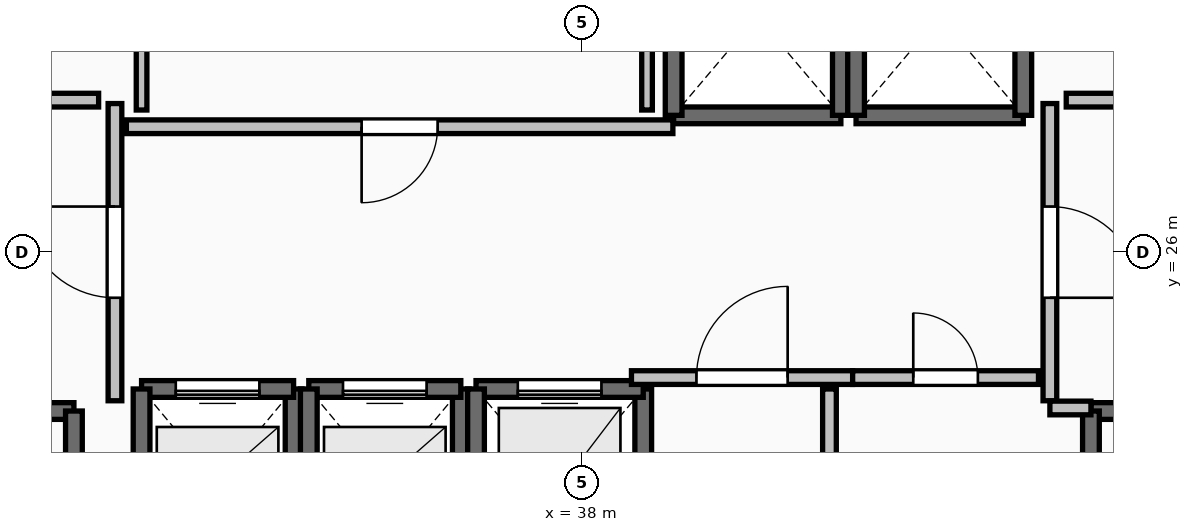
"""IFC4 building model, lengths in metres.
Left out: names, types, materials, properties, quantities, classifications, styles, units other than length and angle.
Written with IfcOpenShell. Run it as: python <this file> out.ifc"""

import sys

from ifc_helpers import new_model, si_unit, direction, frame, frame_2d, origin, place, context, subcontext, project, spatial, rectangle, extrude, element, fill, save


model = new_model("IFC4")
c1 = context("Model", 3, precision=1e-05, world=origin(), true_north=direction((0.0, 1.0)))
c2 = subcontext(c1, "Body", "Model", "MODEL_VIEW")
j1 = project(units=[si_unit("LENGTHUNIT", "METRE"), si_unit("PLANEANGLEUNIT", "RADIAN")], contexts=[c1])
p1 = place(None, origin())
s1 = spatial("IfcSite", under=j1, at=p1, CompositionType="ELEMENT")
p2 = place(p1, origin())
s2 = spatial("IfcBuilding", under=s1, at=p2, CompositionType="ELEMENT")
p3 = place(p2, frame((0.0, 0.0, 139.6)))
s3 = spatial("IfcBuildingStorey", under=s2, at=p3, CompositionType="ELEMENT", Elevation=139.6)
p4 = place(p3, frame((27.94, 23.91, 0.0), z_axis=(0.0, 0.0, 1.0), x_axis=(1.0, 0.0, 0.0)))
e1 = element("IfcWall", 1, at=p4, inside=s3, PredefinedType="SOLIDWALL", context=c2, shape_type="SweptSolid", body=[
    extrude(rectangle(XDim=3.37, YDim=0.22, at=frame_2d((1.685, 0.0))), origin(), (0.0, 0.0, 1.0), 3.24),
])
p5 = place(p4, frame((1.135, 0.0, 0.0)))
e2 = element("IfcOpeningElement", 2, at=p5, cuts=e1, PredefinedType="OPENING", context=c2, shape_type="SweptSolid", body=[
    extrude(rectangle(XDim=1.1, YDim=2.15, at=frame_2d((0.55, 1.075))), frame((0.0, 0.125, 0.0), z_axis=(0.0, -1.0, 0.0), x_axis=(1.0, 0.0, 0.0)), (0.0, 0.0, 1.0), 0.25),
])
p6 = place(p3, frame((31.31, 23.91, 0.0), z_axis=(0.0, 0.0, 1.0), x_axis=(0.0, -1.0, 0.0)))
e3 = element("IfcWall", 3, at=p6, inside=s3, PredefinedType="SOLIDWALL", context=c2, shape_type="SweptSolid", body=[
    extrude(rectangle(XDim=7.42, YDim=0.22, at=frame_2d((3.71, 0.0))), origin(), (0.0, 0.0, 1.0), 3.24),
])
p7 = place(p3, frame((44.69, 23.91, 0.0), z_axis=(0.0, 0.0, 1.0), x_axis=(1.0, 0.0, 0.0)))
e4 = element("IfcWall", 4, at=p7, inside=s3, PredefinedType="SOLIDWALL", context=c2, shape_type="SweptSolid", body=[
    extrude(rectangle(XDim=3.37, YDim=0.22, at=frame_2d((1.685, 0.0))), origin(), (0.0, 0.0, 1.0), 3.24),
])
p8 = place(p7, frame((1.135, 0.0, 0.0)))
e5 = element("IfcOpeningElement", 5, at=p8, cuts=e4, PredefinedType="OPENING", context=c2, shape_type="SweptSolid", body=[
    extrude(rectangle(XDim=1.1, YDim=2.15, at=frame_2d((0.55, 1.075))), frame((0.0, 0.125, 0.0), z_axis=(0.0, -1.0, 0.0), x_axis=(1.0, 0.0, 0.0)), (0.0, 0.0, 1.0), 0.25),
])
p9 = place(p3, frame((44.69, 16.49, 0.0), z_axis=(0.0, 0.0, 1.0), x_axis=(0.0, 1.0, 0.0)))
e6 = element("IfcWall", 6, at=p9, inside=s3, PredefinedType="SOLIDWALL", context=c2, shape_type="SweptSolid", body=[
    extrude(rectangle(XDim=7.42, YDim=0.22, at=frame_2d((3.71, 0.0))), origin(), (0.0, 0.0, 1.0), 3.24),
])
p10 = place(p3, frame((34.2, 21.8, 0.0), z_axis=(0.0, 0.0, 1.0), x_axis=(0.0, 1.0, 0.0)))
e7 = element("IfcWall", 7, at=p10, inside=s3, PredefinedType="SOLIDWALL", context=c2, shape_type="SweptSolid", body=[
    extrude(rectangle(XDim=2.4, YDim=0.22, at=frame_2d((1.2, 0.0))), origin(), (0.0, 0.0, 1.0), 3.24),
])
p11 = place(p3, frame((34.2, 24.2, 0.0), z_axis=(0.0, 0.0, 1.0), x_axis=(-1.0, 0.0, 0.0)))
e8 = element("IfcWall", 8, at=p11, inside=s3, PredefinedType="SOLIDWALL", context=c2, shape_type="SweptSolid", body=[
    extrude(rectangle(XDim=2.0, YDim=0.22, at=frame_2d((1.0, 0.0))), origin(), (0.0, 0.0, 1.0), 3.24),
])
p12 = place(p11, frame((0.45, 0.0, 0.0)))
e9 = element("IfcOpeningElement", 9, at=p12, cuts=e8, PredefinedType="OPENING", context=c2, shape_type="SweptSolid", body=[
    extrude(rectangle(XDim=1.1, YDim=2.2, at=frame_2d((0.55, 1.1))), frame((0.0, 0.125, 0.0), z_axis=(0.0, -1.0, 0.0), x_axis=(1.0, 0.0, 0.0)), (0.0, 0.0, 1.0), 0.25),
])
for number, where, z_axis, x_axis in (
    (10, (32.2, 24.2, 0.0), (0.0, 0.0, 1.0), (0.0, -1.0, 0.0)),
    (11, (36.4, 21.8, 0.0), (0.0, 0.0, 1.0), (0.0, 1.0, 0.0)),
):
    element("IfcWall", number, at=place(p3, frame(where, z_axis=z_axis, x_axis=x_axis)), inside=s3, PredefinedType="SOLIDWALL", context=c2, shape_type="SweptSolid", body=[
        extrude(rectangle(XDim=2.4, YDim=0.22, at=frame_2d((1.2, 0.0))), origin(), (0.0, 0.0, 1.0), 3.24),
    ])
p13 = place(p3, frame((36.4, 24.2, 0.0), z_axis=(0.0, 0.0, 1.0), x_axis=(-1.0, 0.0, 0.0)))
e12 = element("IfcWall", 12, at=p13, inside=s3, PredefinedType="SOLIDWALL", context=c2, shape_type="SweptSolid", body=[
    extrude(rectangle(XDim=2.0, YDim=0.22, at=frame_2d((1.0, 0.0))), origin(), (0.0, 0.0, 1.0), 3.24),
])
p14 = place(p13, frame((0.45, 0.0, 0.0)))
e13 = element("IfcOpeningElement", 13, at=p14, cuts=e12, PredefinedType="OPENING", context=c2, shape_type="SweptSolid", body=[
    extrude(rectangle(XDim=1.1, YDim=2.2, at=frame_2d((0.55, 1.1))), frame((0.0, 0.125, 0.0), z_axis=(0.0, -1.0, 0.0), x_axis=(1.0, 0.0, 0.0)), (0.0, 0.0, 1.0), 0.25),
])
p15 = place(p3, frame((34.4, 24.2, 0.0), z_axis=(0.0, 0.0, 1.0), x_axis=(0.0, -1.0, 0.0)))
e14 = element("IfcWall", 14, at=p15, inside=s3, PredefinedType="SOLIDWALL", context=c2, shape_type="SweptSolid", body=[
    extrude(rectangle(XDim=2.4, YDim=0.22, at=frame_2d((1.2, 0.0))), origin(), (0.0, 0.0, 1.0), 3.24),
])
p16 = place(p3, frame((38.8, 21.6, 0.0), z_axis=(0.0, 0.0, 1.0), x_axis=(0.0, 1.0, 0.0)))
e15 = element("IfcWall", 15, at=p16, inside=s3, PredefinedType="SOLIDWALL", context=c2, shape_type="SweptSolid", body=[
    extrude(rectangle(XDim=2.6, YDim=0.22, at=frame_2d((1.3, 0.0))), origin(), (0.0, 0.0, 1.0), 3.24),
])
p17 = place(p3, frame((38.8, 24.2, 0.0), z_axis=(0.0, 0.0, 1.0), x_axis=(-1.0, 0.0, 0.0)))
e16 = element("IfcWall", 16, at=p17, inside=s3, PredefinedType="SOLIDWALL", context=c2, shape_type="SweptSolid", body=[
    extrude(rectangle(XDim=2.2, YDim=0.22, at=frame_2d((1.1, 0.0))), origin(), (0.0, 0.0, 1.0), 3.24),
])
p18 = place(p17, frame((0.55, 0.0, 0.0)))
e17 = element("IfcOpeningElement", 17, at=p18, cuts=e16, PredefinedType="OPENING", context=c2, shape_type="SweptSolid", body=[
    extrude(rectangle(XDim=1.1, YDim=2.2, at=frame_2d((0.55, 1.1))), frame((0.0, 0.125, 0.0), z_axis=(0.0, -1.0, 0.0), x_axis=(1.0, 0.0, 0.0)), (0.0, 0.0, 1.0), 0.25),
])
p19 = place(p3, frame((36.6, 24.2, 0.0), z_axis=(0.0, 0.0, 1.0), x_axis=(0.0, -1.0, 0.0)))
e18 = element("IfcWall", 18, at=p19, inside=s3, PredefinedType="SOLIDWALL", context=c2, shape_type="SweptSolid", body=[
    extrude(rectangle(XDim=2.6, YDim=0.22, at=frame_2d((1.3, 0.0))), origin(), (0.0, 0.0, 1.0), 3.24),
])
p20 = place(p3, frame((39.2, 27.8, 0.0), z_axis=(0.0, 0.0, 1.0), x_axis=(1.0, 0.0, 0.0)))
e19 = element("IfcWall", 19, at=p20, inside=s3, PredefinedType="SOLIDWALL", context=c2, shape_type="SweptSolid", body=[
    extrude(rectangle(XDim=2.2, YDim=0.22, at=frame_2d((1.1, 0.0))), origin(), (0.0, 0.0, 1.0), 3.24),
])
for number, where, z_axis, x_axis in (
    (20, (41.4, 27.8, 0.0), (0.0, 0.0, 1.0), (0.0, 1.0, 0.0)),
    (21, (39.2, 30.4, 0.0), (0.0, 0.0, 1.0), (0.0, -1.0, 0.0)),
):
    element("IfcWall", number, at=place(p3, frame(where, z_axis=z_axis, x_axis=x_axis)), inside=s3, PredefinedType="SOLIDWALL", context=c2, shape_type="SweptSolid", body=[
        extrude(rectangle(XDim=2.6, YDim=0.22, at=frame_2d((1.3, 0.0))), origin(), (0.0, 0.0, 1.0), 3.24),
    ])
p21 = place(p3, frame((41.6, 27.8, 0.0), z_axis=(0.0, 0.0, 1.0), x_axis=(1.0, 0.0, 0.0)))
e22 = element("IfcWall", 22, at=p21, inside=s3, PredefinedType="SOLIDWALL", context=c2, shape_type="SweptSolid", body=[
    extrude(rectangle(XDim=2.2, YDim=0.22, at=frame_2d((1.1, 0.0))), origin(), (0.0, 0.0, 1.0), 3.24),
])
for number, where, z_axis, x_axis in (
    (23, (43.8, 27.8, 0.0), (0.0, 0.0, 1.0), (0.0, 1.0, 0.0)),
    (24, (41.6, 30.4, 0.0), (0.0, 0.0, 1.0), (0.0, -1.0, 0.0)),
):
    element("IfcWall", number, at=place(p3, frame(where, z_axis=z_axis, x_axis=x_axis)), inside=s3, PredefinedType="SOLIDWALL", context=c2, shape_type="SweptSolid", body=[
        extrude(rectangle(XDim=2.6, YDim=0.22, at=frame_2d((1.3, 0.0))), origin(), (0.0, 0.0, 1.0), 3.24),
    ])
p22 = place(p3, frame((31.85, 24.045, 0.0), z_axis=(0.0, 0.0, 1.0), x_axis=(0.0, 1.0, 0.0)))
e25 = element("IfcWall", 25, at=p22, inside=s3, PredefinedType="PARTITIONING", context=c2, shape_type="SweptSolid", body=[
    extrude(rectangle(XDim=3.91, YDim=0.18, at=frame_2d((1.955, 0.0))), origin(), (0.0, 0.0, 1.0), 3.24),
])
p23 = place(p22, frame((1.355, 0.0, 0.0)))
e26 = element("IfcOpeningElement", 26, at=p23, cuts=e25, PredefinedType="OPENING", context=c2, shape_type="SweptSolid", body=[
    extrude(rectangle(XDim=1.2, YDim=2.15, at=frame_2d((0.6, 1.075))), frame((0.0, 0.105, 0.0), z_axis=(0.0, -1.0, 0.0), x_axis=(1.0, 0.0, 0.0)), (0.0, 0.0, 1.0), 0.21),
])
p24 = place(p3, frame((44.15, 27.955, 0.0), z_axis=(0.0, 0.0, 1.0), x_axis=(0.0, -1.0, 0.0)))
e27 = element("IfcWall", 27, at=p24, inside=s3, PredefinedType="PARTITIONING", context=c2, shape_type="SweptSolid", body=[
    extrude(rectangle(XDim=3.91, YDim=0.18, at=frame_2d((1.955, 0.0))), origin(), (0.0, 0.0, 1.0), 3.24),
])
p25 = place(p24, frame((1.355, 0.0, 0.0)))
e28 = element("IfcOpeningElement", 28, at=p25, cuts=e27, PredefinedType="OPENING", context=c2, shape_type="SweptSolid", body=[
    extrude(rectangle(XDim=1.2, YDim=2.15, at=frame_2d((0.6, 1.075))), frame((0.0, 0.105, 0.0), z_axis=(0.0, -1.0, 0.0), x_axis=(1.0, 0.0, 0.0)), (0.0, 0.0, 1.0), 0.21),
])
p26 = place(p3, frame((44.15, 23.95, 0.0), z_axis=(0.0, 0.0, 1.0), x_axis=(1.0, 0.0, 0.0)))
e29 = element("IfcWall", 29, at=p26, inside=s3, PredefinedType="PARTITIONING", context=c2, shape_type="SweptSolid", body=[
    extrude(rectangle(XDim=0.54, YDim=0.18, at=frame_2d((0.27, 0.0))), origin(), (0.0, 0.0, 1.0), 3.24),
])
p27 = place(p3, frame((38.645, 24.35, 0.0), z_axis=(0.0, 0.0, 1.0), x_axis=(1.0, 0.0, 0.0)))
e30 = element("IfcWall", 30, at=p27, inside=s3, PredefinedType="PARTITIONING", context=c2, shape_type="SweptSolid", body=[
    extrude(rectangle(XDim=2.91, YDim=0.18, at=frame_2d((1.455, 0.0))), origin(), (0.0, 0.0, 1.0), 3.24),
])
p28 = place(p27, frame((0.855, 0.0, 0.0)))
e31 = element("IfcOpeningElement", 31, at=p28, cuts=e30, PredefinedType="OPENING", context=c2, shape_type="SweptSolid", body=[
    extrude(rectangle(XDim=1.2, YDim=2.15, at=frame_2d((0.6, 1.075))), frame((0.0, 0.105, 0.0), z_axis=(0.0, -1.0, 0.0), x_axis=(1.0, 0.0, 0.0)), (0.0, 0.0, 1.0), 0.21),
])
p29 = place(p3, frame((41.555, 24.35, 0.0), z_axis=(0.0, 0.0, 1.0), x_axis=(1.0, 0.0, 0.0)))
e32 = element("IfcWall", 32, at=p29, inside=s3, PredefinedType="PARTITIONING", context=c2, shape_type="SweptSolid", body=[
    extrude(rectangle(XDim=2.445, YDim=0.18, at=frame_2d((1.223, 0.0))), origin(), (0.0, 0.0, 1.0), 3.24),
])
p30 = place(p29, frame((0.798, 0.0, 0.0)))
e33 = element("IfcOpeningElement", 33, at=p30, cuts=e32, PredefinedType="OPENING", context=c2, shape_type="SweptSolid", body=[
    extrude(rectangle(XDim=0.85, YDim=2.1, at=frame_2d((0.425, 1.05))), frame((0.0, 0.105, 0.0), z_axis=(0.0, -1.0, 0.0), x_axis=(1.0, 0.0, 0.0)), (0.0, 0.0, 1.0), 0.21),
])
p31 = place(p3, frame((39.19, 27.65, 0.0), z_axis=(0.0, 0.0, 1.0), x_axis=(-1.0, 0.0, 0.0)))
e34 = element("IfcWall", 34, at=p31, inside=s3, PredefinedType="PARTITIONING", context=c2, shape_type="SweptSolid", body=[
    extrude(rectangle(XDim=7.19, YDim=0.18, at=frame_2d((3.595, 0.0))), origin(), (0.0, 0.0, 1.0), 3.24),
])
p32 = place(p31, frame((3.095, 0.0, 0.0)))
e35 = element("IfcOpeningElement", 35, at=p32, cuts=e34, PredefinedType="OPENING", context=c2, shape_type="SweptSolid", body=[
    extrude(rectangle(XDim=1.0, YDim=2.15, at=frame_2d((0.5, 1.075))), frame((0.0, 0.105, 0.0), z_axis=(0.0, -1.0, 0.0), x_axis=(1.0, 0.0, 0.0)), (0.0, 0.0, 1.0), 0.21),
])
p33 = place(p3, frame((41.25, 20.305, 0.0), z_axis=(0.0, 0.0, 1.0), x_axis=(0.0, 1.0, 0.0)))
e36 = element("IfcWall", 36, at=p33, inside=s3, PredefinedType="PARTITIONING", context=c2, shape_type="SweptSolid", body=[
    extrude(rectangle(XDim=3.895, YDim=0.18, at=frame_2d((1.948, 0.0))), origin(), (0.0, 0.0, 1.0), 3.24),
])
p34 = place(p33, frame((1.522, 0.0, 0.0)))
e37 = element("IfcOpeningElement", 37, at=p34, cuts=e36, PredefinedType="OPENING", context=c2, shape_type="SweptSolid", body=[
    extrude(rectangle(XDim=0.85, YDim=2.1, at=frame_2d((0.425, 1.05))), frame((0.0, 0.105, 0.0), z_axis=(0.0, -1.0, 0.0), x_axis=(1.0, 0.0, 0.0)), (0.0, 0.0, 1.0), 0.21),
])
for number, where, z_axis, x_axis in (
    (38, (31.635, 28.0, 0.0), (0.0, 0.0, 1.0), (-1.0, 0.0, 0.0)),
    (39, (45.28, 28.0, 0.0), (0.0, 0.0, 1.0), (-1.0, 0.0, 0.0)),
):
    element("IfcWall", number, at=place(p3, frame(where, z_axis=z_axis, x_axis=x_axis)), inside=s3, PredefinedType="PARTITIONING", context=c2, shape_type="SweptSolid", body=[
        extrude(rectangle(XDim=0.915, YDim=0.18, at=frame_2d((0.458, 0.0))), origin(), (0.0, 0.0, 1.0), 3.24),
    ])
for number, where, z_axis, x_axis in (
    (40, (32.2, 30.26, 0.0), (0.0, 0.0, 1.0), (0.0, -1.0, 0.0)),
    (41, (38.85, 27.87, 0.0), (0.0, 0.0, 1.0), (0.0, 1.0, 0.0)),
):
    element("IfcWall", number, at=place(p3, frame(where, z_axis=z_axis, x_axis=x_axis)), inside=s3, PredefinedType="PARTITIONING", context=c2, shape_type="SweptSolid", body=[
        extrude(rectangle(XDim=2.39, YDim=0.14, at=frame_2d((1.195, 0.0))), origin(), (0.0, 0.0, 1.0), 3.24),
    ])
p35 = place(p12, origin())
e42 = element("IfcDoor", 42, at=p35, inside=s3, OperationType="SLIDING_TO_LEFT", PredefinedType="DOOR", context=c2, shape_type="SweptSolid", body=[
    extrude(rectangle(XDim=1.1, YDim=2.2, at=frame_2d((0.55, 1.1))), frame((0.0, 0.025, 0.0), z_axis=(0.0, -1.0, 0.0), x_axis=(1.0, 0.0, 0.0)), (0.0, 0.0, 1.0), 0.05),
])
fill(e9, e42)
p36 = place(p14, origin())
e43 = element("IfcDoor", 43, at=p36, inside=s3, OperationType="SLIDING_TO_LEFT", PredefinedType="DOOR", context=c2, shape_type="SweptSolid", body=[
    extrude(rectangle(XDim=1.1, YDim=2.2, at=frame_2d((0.55, 1.1))), frame((0.0, 0.025, 0.0), z_axis=(0.0, -1.0, 0.0), x_axis=(1.0, 0.0, 0.0)), (0.0, 0.0, 1.0), 0.05),
])
fill(e13, e43)
p37 = place(p18, origin())
e44 = element("IfcDoor", 44, at=p37, inside=s3, OperationType="SLIDING_TO_LEFT", PredefinedType="DOOR", context=c2, shape_type="SweptSolid", body=[
    extrude(rectangle(XDim=1.1, YDim=2.2, at=frame_2d((0.55, 1.1))), frame((0.0, 0.025, 0.0), z_axis=(0.0, -1.0, 0.0), x_axis=(1.0, 0.0, 0.0)), (0.0, 0.0, 1.0), 0.05),
])
fill(e17, e44)
p38 = place(p23, origin())
e45 = element("IfcDoor", 45, at=p38, inside=s3, OperationType="SINGLE_SWING_RIGHT", PredefinedType="DOOR", context=c2, shape_type="SweptSolid", body=[
    extrude(rectangle(XDim=1.2, YDim=2.15, at=frame_2d((0.6, 1.075))), frame((0.0, 0.025, 0.0), z_axis=(0.0, -1.0, 0.0), x_axis=(1.0, 0.0, 0.0)), (0.0, 0.0, 1.0), 0.05),
])
fill(e26, e45)
p39 = place(p25, origin())
e46 = element("IfcDoor", 46, at=p39, inside=s3, OperationType="SINGLE_SWING_RIGHT", PredefinedType="DOOR", context=c2, shape_type="SweptSolid", body=[
    extrude(rectangle(XDim=1.2, YDim=2.15, at=frame_2d((0.6, 1.075))), frame((0.0, 0.025, 0.0), z_axis=(0.0, -1.0, 0.0), x_axis=(1.0, 0.0, 0.0)), (0.0, 0.0, 1.0), 0.05),
])
fill(e28, e46)
p40 = place(p28, origin())
e47 = element("IfcDoor", 47, at=p40, inside=s3, OperationType="SINGLE_SWING_RIGHT", PredefinedType="DOOR", context=c2, shape_type="SweptSolid", body=[
    extrude(rectangle(XDim=1.2, YDim=2.15, at=frame_2d((0.6, 1.075))), frame((0.0, 0.025, 0.0), z_axis=(0.0, -1.0, 0.0), x_axis=(1.0, 0.0, 0.0)), (0.0, 0.0, 1.0), 0.05),
])
fill(e31, e47)
p41 = place(p30, origin())
e48 = element("IfcDoor", 48, at=p41, inside=s3, OperationType="SINGLE_SWING_LEFT", PredefinedType="DOOR", context=c2, shape_type="SweptSolid", body=[
    extrude(rectangle(XDim=0.85, YDim=2.1, at=frame_2d((0.425, 1.05))), frame((0.0, 0.025, 0.0), z_axis=(0.0, -1.0, 0.0), x_axis=(1.0, 0.0, 0.0)), (0.0, 0.0, 1.0), 0.05),
])
fill(e33, e48)
p42 = place(p32, origin())
e49 = element("IfcDoor", 49, at=p42, inside=s3, OperationType="SINGLE_SWING_RIGHT", PredefinedType="DOOR", context=c2, shape_type="SweptSolid", body=[
    extrude(rectangle(XDim=1.0, YDim=2.15, at=frame_2d((0.5, 1.075))), frame((0.0, 0.025, 0.0), z_axis=(0.0, -1.0, 0.0), x_axis=(1.0, 0.0, 0.0)), (0.0, 0.0, 1.0), 0.05),
])
fill(e35, e49)
save(model, sys.argv[1])
